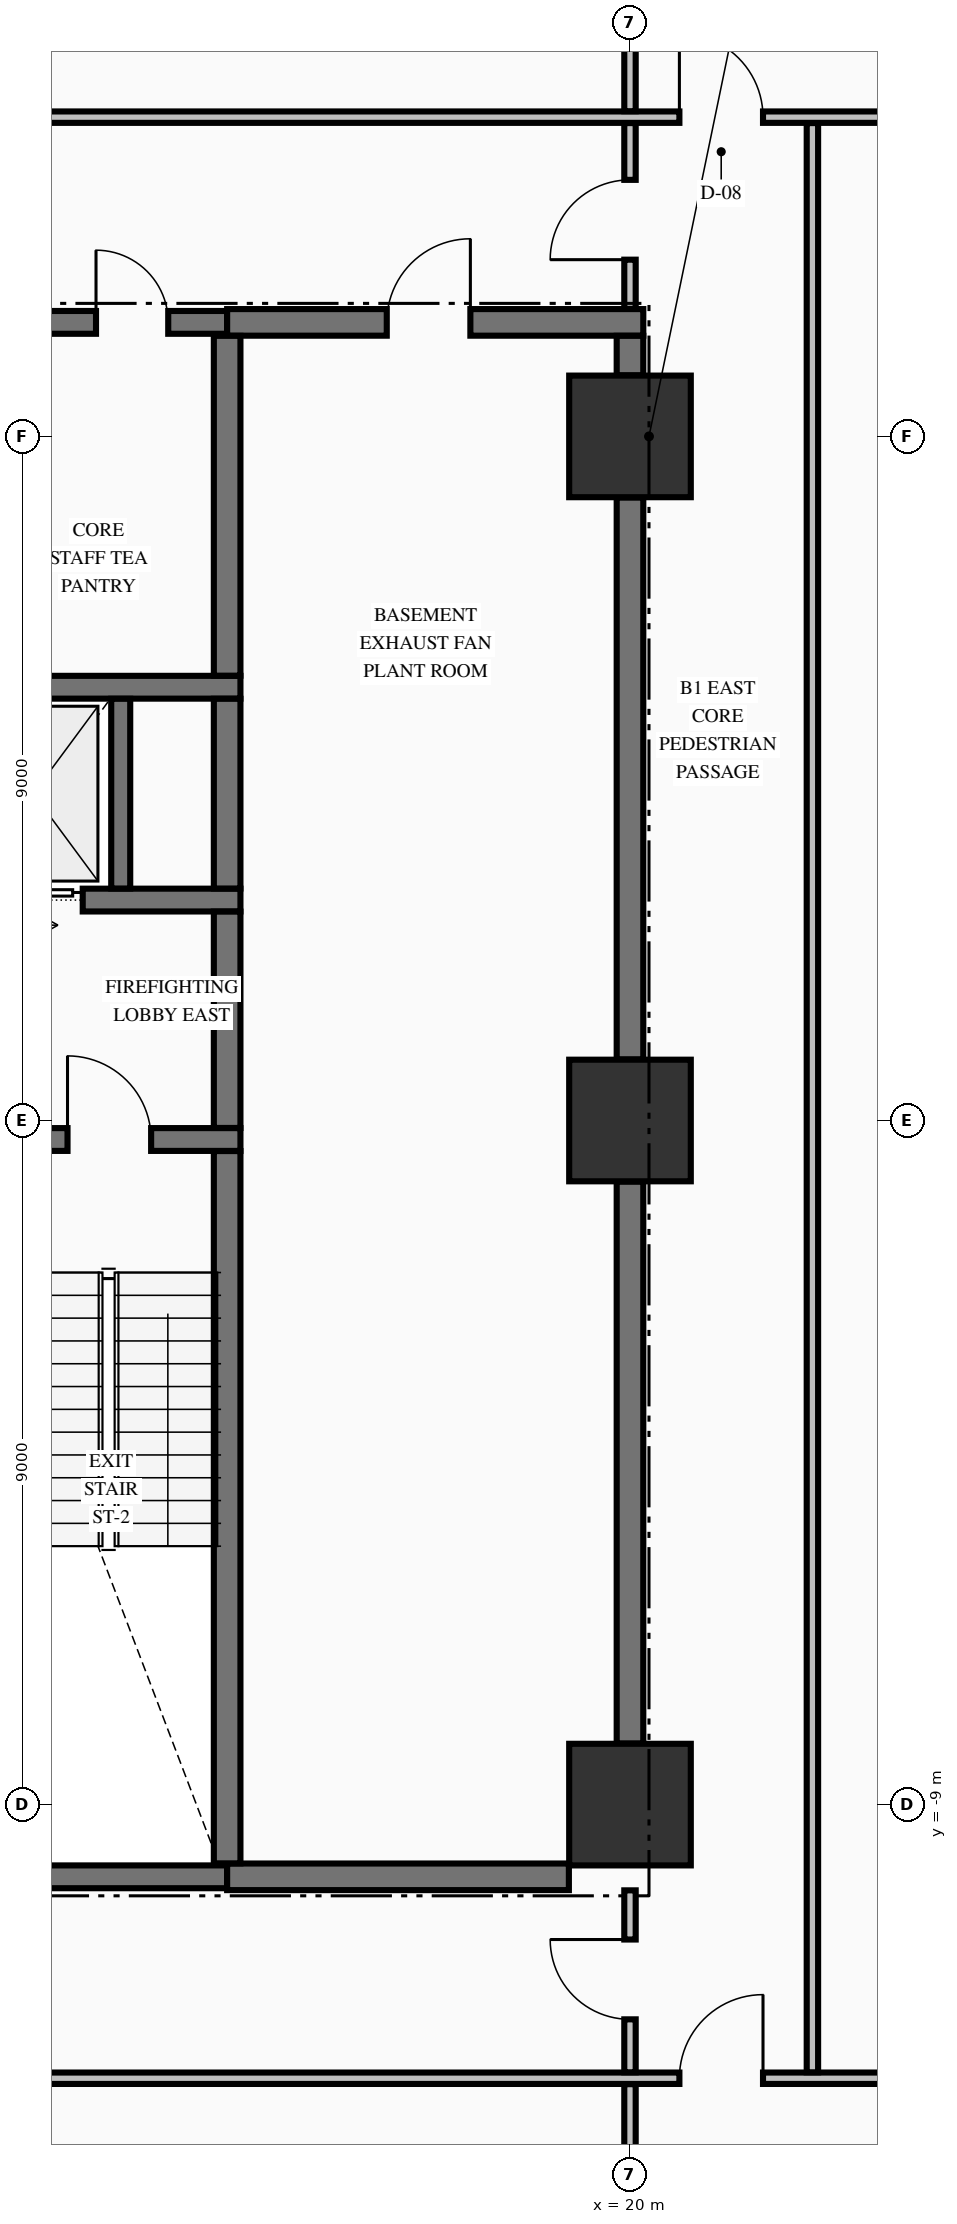
"""IFC4 building model, lengths in metres.
Left out: names, types, materials, properties, quantities, classifications, styles, units other than length and angle.
Written with IfcOpenShell. Run it as: python <this file> out.ifc"""

import sys

from ifc_helpers import new_model, si_unit, direction, frame, frame_2d, origin, origin_2d, place, context, subcontext, project, spatial, rectangle, extrude, element, fill, save


model = new_model("IFC4")
c1 = context("Model", 3, precision=1e-05, world=origin(), true_north=direction((0.0, 1.0)))
c2 = subcontext(c1, "Body", "Model", "MODEL_VIEW")
j1 = project(units=[si_unit("LENGTHUNIT", "METRE"), si_unit("PLANEANGLEUNIT", "RADIAN")], contexts=[c1])
p1 = place(None, origin())
s1 = spatial("IfcSite", under=j1, at=p1, CompositionType="ELEMENT")
p2 = place(p1, origin())
s2 = spatial("IfcBuilding", under=s1, at=p2, CompositionType="ELEMENT")
p3 = place(p2, frame((0.0, 0.0, -4.55)))
s3 = spatial("IfcBuildingStorey", under=s2, at=p3, CompositionType="ELEMENT", Elevation=-4.55)
for number, where, z_axis, x_axis in (
    (1, (20.0, -9.0, 0.0), (0.0, 0.0, 1.0), (1.0, 0.0, 0.0)),
    (2, (20.0, 0.0, 0.0), (0.0, 0.0, 1.0), (1.0, 0.0, 0.0)),
    (3, (20.0, 9.0, 0.0), (0.0, 0.0, 1.0), (1.0, 0.0, 0.0)),
):
    element("IfcColumn", number, at=place(p3, frame(where, z_axis=z_axis, x_axis=x_axis)), inside=s3, PredefinedType="COLUMN", context=c2, shape_type="SweptSolid", body=[
        extrude(rectangle(XDim=1.6, YDim=1.6, at=origin_2d()), origin(), (0.0, 0.0, 1.0), 4.2),
    ])
p4 = place(p3, frame((10.85, -9.95, 0.0), z_axis=(0.0, 0.0, 1.0), x_axis=(1.0, 0.0, 0.0)))
e4 = element("IfcWall", 4, at=p4, inside=s3, PredefinedType="SHEAR", context=c2, shape_type="SweptSolid", body=[
    extrude(rectangle(XDim=3.85, YDim=0.3, at=frame_2d((1.925, 0.0))), origin(), (0.0, 0.0, 1.0), 4.2),
])
p5 = place(p3, frame((14.7, -9.95, 0.0), z_axis=(0.0, 0.0, 1.0), x_axis=(1.0, 0.0, 0.0)))
e5 = element("IfcWall", 5, at=p5, inside=s3, PredefinedType="SHEAR", context=c2, shape_type="SweptSolid", body=[
    extrude(rectangle(XDim=4.496, YDim=0.35, at=frame_2d((2.248, 0.0))), origin(), (0.0, 0.0, 1.0), 4.2),
])
p6 = place(p3, frame((11.804, -0.25, 0.0), z_axis=(0.0, 0.0, 1.0), x_axis=(1.0, 0.0, 0.0)))
e6 = element("IfcWall", 6, at=p6, inside=s3, PredefinedType="SHEAR", context=c2, shape_type="SweptSolid", body=[
    extrude(rectangle(XDim=3.071, YDim=0.3, at=frame_2d((1.536, 0.0))), origin(), (0.0, 0.0, 1.0), 4.2),
])
p7 = place(p6, frame((0.796, 0.0, 0.0)))
e7 = element("IfcOpeningElement", 7, at=p7, cuts=e6, PredefinedType="OPENING", context=c2, shape_type="SweptSolid", body=[
    extrude(rectangle(XDim=1.1, YDim=2.15, at=frame_2d((0.55, 1.075))), frame((0.0, 0.16, 0.0), z_axis=(0.0, -1.0, 0.0), x_axis=(1.0, 0.0, 0.0)), (0.0, 0.0, 1.0), 0.32),
])
p8 = place(p3, frame((10.85, 2.9, 0.0), z_axis=(0.0, 0.0, 1.0), x_axis=(1.0, 0.0, 0.0)))
e8 = element("IfcWall", 8, at=p8, inside=s3, PredefinedType="SHEAR", context=c2, shape_type="SweptSolid", body=[
    extrude(rectangle(XDim=4.025, YDim=0.3, at=frame_2d((2.012, 0.0))), origin(), (0.0, 0.0, 1.0), 4.2),
])
p9 = place(p8, frame((0.85, 0.0, 0.0)))
e9 = element("IfcOpeningElement", 9, at=p9, cuts=e8, PredefinedType="OPENING", context=c2, shape_type="SweptSolid", body=[
    extrude(rectangle(XDim=1.1, YDim=2.2, at=frame_2d((0.55, 1.1))), frame((0.0, 0.16, 0.0), z_axis=(0.0, -1.0, 0.0), x_axis=(1.0, 0.0, 0.0)), (0.0, 0.0, 1.0), 0.32),
])
p10 = place(p3, frame((10.85, 5.7, 0.0), z_axis=(0.0, 0.0, 1.0), x_axis=(1.0, 0.0, 0.0)))
e10 = element("IfcWall", 10, at=p10, inside=s3, PredefinedType="SHEAR", context=c2, shape_type="SweptSolid", body=[
    extrude(rectangle(XDim=4.025, YDim=0.3, at=frame_2d((2.012, 0.0))), origin(), (0.0, 0.0, 1.0), 4.2),
])
p11 = place(p3, frame((10.85, 10.5, 0.0), z_axis=(0.0, 0.0, 1.0), x_axis=(1.0, 0.0, 0.0)))
e11 = element("IfcWall", 11, at=p11, inside=s3, PredefinedType="SHEAR", context=c2, shape_type="SweptSolid", body=[
    extrude(rectangle(XDim=3.85, YDim=0.3, at=frame_2d((1.925, 0.0))), origin(), (0.0, 0.0, 1.0), 4.2),
])
p12 = place(p11, frame((2.125, 0.0, 0.0)))
e12 = element("IfcOpeningElement", 12, at=p12, cuts=e11, PredefinedType="OPENING", context=c2, shape_type="SweptSolid", body=[
    extrude(rectangle(XDim=0.95, YDim=2.15, at=frame_2d((0.475, 1.075))), frame((0.0, 0.16, 0.0), z_axis=(0.0, -1.0, 0.0), x_axis=(1.0, 0.0, 0.0)), (0.0, 0.0, 1.0), 0.32),
])
p13 = place(p3, frame((14.7, 10.5, 0.0), z_axis=(0.0, 0.0, 1.0), x_axis=(1.0, 0.0, 0.0)))
e13 = element("IfcWall", 13, at=p13, inside=s3, PredefinedType="SHEAR", context=c2, shape_type="SweptSolid", body=[
    extrude(rectangle(XDim=5.475, YDim=0.35, at=frame_2d((2.738, 0.0))), origin(), (0.0, 0.0, 1.0), 4.2),
])
p14 = place(p13, frame((2.1, 0.0, 0.0)))
e14 = element("IfcOpeningElement", 14, at=p14, cuts=e13, PredefinedType="OPENING", context=c2, shape_type="SweptSolid", body=[
    extrude(rectangle(XDim=1.1, YDim=2.15, at=frame_2d((0.55, 1.075))), frame((0.0, 0.185, 0.0), z_axis=(0.0, -1.0, 0.0), x_axis=(1.0, 0.0, 0.0)), (0.0, 0.0, 1.0), 0.37),
])
p15 = place(p3, frame((-33.722, -12.6, 0.0), z_axis=(0.0, 0.0, 1.0), x_axis=(1.0, 0.0, 0.0)))
e15 = element("IfcWall", 15, at=p15, inside=s3, PredefinedType="PARTITIONING", context=c2, shape_type="SweptSolid", body=[
    extrude(rectangle(XDim=67.444, YDim=0.15, at=frame_2d((33.722, 0.0))), origin(), (0.0, 0.0, 1.0), 3.74),
])
p16 = place(p15, frame((11.972, 0.0, 0.0)))
e16 = element("IfcOpeningElement", 16, at=p16, cuts=e15, PredefinedType="OPENING", context=c2, shape_type="SweptSolid", body=[
    extrude(rectangle(XDim=1.1, YDim=2.15, at=frame_2d((0.55, 1.075))), frame((0.0, 0.085, 0.0), z_axis=(0.0, -1.0, 0.0), x_axis=(1.0, 0.0, 0.0)), (0.0, 0.0, 1.0), 0.17),
])
p17 = place(p15, frame((54.372, 0.0, 0.0)))
e17 = element("IfcOpeningElement", 17, at=p17, cuts=e15, PredefinedType="OPENING", context=c2, shape_type="SweptSolid", body=[
    extrude(rectangle(XDim=1.1, YDim=2.15, at=frame_2d((0.55, 1.075))), frame((0.0, 0.085, 0.0), z_axis=(0.0, -1.0, 0.0), x_axis=(1.0, 0.0, 0.0)), (0.0, 0.0, 1.0), 0.17),
])
p18 = place(p15, frame((38.622, 0.0, 0.0)))
e18 = element("IfcOpeningElement", 18, at=p18, cuts=e15, PredefinedType="OPENING", context=c2, shape_type="SweptSolid", body=[
    extrude(rectangle(XDim=1.2, YDim=2.15, at=frame_2d((0.6, 1.075))), frame((0.0, 0.085, 0.0), z_axis=(0.0, -1.0, 0.0), x_axis=(1.0, 0.0, 0.0)), (0.0, 0.0, 1.0), 0.17),
])
p19 = place(p3, frame((-22.475, 13.2, 0.0), z_axis=(0.0, 0.0, 1.0), x_axis=(1.0, 0.0, 0.0)))
e19 = element("IfcWall", 19, at=p19, inside=s3, PredefinedType="PARTITIONING", context=c2, shape_type="SweptSolid", body=[
    extrude(rectangle(XDim=56.197, YDim=0.15, at=frame_2d((28.099, 0.0))), origin(), (0.0, 0.0, 1.0), 4.2),
])
p20 = place(p19, frame((43.125, 0.0, 0.0)))
e20 = element("IfcOpeningElement", 20, at=p20, cuts=e19, PredefinedType="OPENING", context=c2, shape_type="SweptSolid", body=[
    extrude(rectangle(XDim=1.1, YDim=2.15, at=frame_2d((0.55, 1.075))), frame((0.0, 0.085, 0.0), z_axis=(0.0, -1.0, 0.0), x_axis=(1.0, 0.0, 0.0)), (0.0, 0.0, 1.0), 0.17),
])
p21 = place(p19, frame((27.375, 0.0, 0.0)))
e21 = element("IfcOpeningElement", 21, at=p21, cuts=e19, PredefinedType="OPENING", context=c2, shape_type="SweptSolid", body=[
    extrude(rectangle(XDim=1.2, YDim=2.15, at=frame_2d((0.6, 1.075))), frame((0.0, 0.085, 0.0), z_axis=(0.0, -1.0, 0.0), x_axis=(1.0, 0.0, 0.0)), (0.0, 0.0, 1.0), 0.17),
])
p22 = place(p19, frame((46.375, 0.0, 0.0)))
e22 = element("IfcOpeningElement", 22, at=p22, cuts=e19, PredefinedType="OPENING", context=c2, shape_type="SweptSolid", body=[
    extrude(rectangle(XDim=1.2, YDim=2.15, at=frame_2d((0.6, 1.075))), frame((0.0, 0.085, 0.0), z_axis=(0.0, -1.0, 0.0), x_axis=(1.0, 0.0, 0.0)), (0.0, 0.0, 1.0), 0.17),
])
p23 = place(p19, frame((16.6, 0.0, 0.0)))
e23 = element("IfcOpeningElement", 23, at=p23, cuts=e19, PredefinedType="OPENING", context=c2, shape_type="SweptSolid", body=[
    extrude(rectangle(XDim=0.95, YDim=2.15, at=frame_2d((0.475, 1.075))), frame((0.0, 0.085, 0.0), z_axis=(0.0, -1.0, 0.0), x_axis=(1.0, 0.0, 0.0)), (0.0, 0.0, 1.0), 0.17),
])
p24 = place(p3, frame((13.3, 3.052, 0.0), z_axis=(0.0, 0.0, 1.0), x_axis=(0.0, 1.0, 0.0)))
e24 = element("IfcWall", 24, at=p24, inside=s3, PredefinedType="SOLIDWALL", context=c2, shape_type="SweptSolid", body=[
    extrude(rectangle(XDim=2.496, YDim=0.25, at=frame_2d((1.248, 0.0))), origin(), (0.0, 0.0, 1.0), 4.2),
])
p25 = place(p3, frame((14.7, -9.773, 0.0), z_axis=(0.0, 0.0, 1.0), x_axis=(0.0, 1.0, 0.0)))
e25 = element("IfcWall", 25, at=p25, inside=s3, PredefinedType="SHEAR", context=c2, shape_type="SweptSolid", body=[
    extrude(rectangle(XDim=9.371, YDim=0.35, at=frame_2d((4.686, 0.0))), origin(), (0.0, 0.0, 1.0), 4.2),
])
p26 = place(p3, frame((14.7, -0.098, 0.0), z_axis=(0.0, 0.0, 1.0), x_axis=(0.0, 1.0, 0.0)))
e26 = element("IfcWall", 26, at=p26, inside=s3, PredefinedType="SHEAR", context=c2, shape_type="SweptSolid", body=[
    extrude(rectangle(XDim=2.846, YDim=0.35, at=frame_2d((1.423, 0.0))), origin(), (0.0, 0.0, 1.0), 4.2),
])
p27 = place(p3, frame((14.7, 3.052, 0.0), z_axis=(0.0, 0.0, 1.0), x_axis=(0.0, 1.0, 0.0)))
e27 = element("IfcWall", 27, at=p27, inside=s3, PredefinedType="SHEAR", context=c2, shape_type="SweptSolid", body=[
    extrude(rectangle(XDim=2.496, YDim=0.35, at=frame_2d((1.248, 0.0))), origin(), (0.0, 0.0, 1.0), 4.2),
])
p28 = place(p3, frame((14.7, 5.852, 0.0), z_axis=(0.0, 0.0, 1.0), x_axis=(0.0, 1.0, 0.0)))
e28 = element("IfcWall", 28, at=p28, inside=s3, PredefinedType="SHEAR", context=c2, shape_type="SweptSolid", body=[
    extrude(rectangle(XDim=4.471, YDim=0.35, at=frame_2d((2.235, 0.0))), origin(), (0.0, 0.0, 1.0), 4.2),
])
for number, where, z_axis, x_axis in (
    (29, (20.0, -8.196, 0.0), (0.0, 0.0, 1.0), (0.0, 1.0, 0.0)),
    (30, (20.0, 0.804, 0.0), (0.0, 0.0, 1.0), (0.0, 1.0, 0.0)),
):
    element("IfcWall", number, at=place(p3, frame(where, z_axis=z_axis, x_axis=x_axis)), inside=s3, PredefinedType="SHEAR", context=c2, shape_type="SweptSolid", body=[
        extrude(rectangle(XDim=7.392, YDim=0.35, at=frame_2d((3.696, 0.0))), origin(), (0.0, 0.0, 1.0), 4.2),
    ])
p29 = place(p3, frame((20.0, 9.804, 0.0), z_axis=(0.0, 0.0, 1.0), x_axis=(0.0, 1.0, 0.0)))
e31 = element("IfcWall", 31, at=p29, inside=s3, PredefinedType="SHEAR", context=c2, shape_type="SweptSolid", body=[
    extrude(rectangle(XDim=0.519, YDim=0.35, at=frame_2d((0.26, 0.0))), origin(), (0.0, 0.0, 1.0), 4.2),
])
p30 = place(p3, frame((20.0, -15.194, 0.0), z_axis=(0.0, 0.0, 1.0), x_axis=(0.0, 1.0, 0.0)))
e32 = element("IfcWall", 32, at=p30, inside=s3, PredefinedType="PARTITIONING", context=c2, shape_type="SweptSolid", body=[
    extrude(rectangle(XDim=2.516, YDim=0.15, at=frame_2d((1.258, 0.0))), origin(), (0.0, 0.0, 1.0), 3.242),
])
p31 = place(p3, frame((20.0, -12.522, 0.0), z_axis=(0.0, 0.0, 1.0), x_axis=(0.0, 1.0, 0.0)))
e33 = element("IfcWall", 33, at=p31, inside=s3, PredefinedType="PARTITIONING", context=c2, shape_type="SweptSolid", body=[
    extrude(rectangle(XDim=2.394, YDim=0.15, at=frame_2d((1.197, 0.0))), origin(), (0.0, 0.0, 1.0), 3.242),
])
p32 = place(p31, frame((0.697, 0.0, 0.0)))
e34 = element("IfcOpeningElement", 34, at=p32, cuts=e33, PredefinedType="OPENING", context=c2, shape_type="SweptSolid", body=[
    extrude(rectangle(XDim=1.05, YDim=2.15, at=frame_2d((0.525, 1.075))), frame((0.0, 0.085, 0.0), z_axis=(0.0, -1.0, 0.0), x_axis=(1.0, 0.0, 0.0)), (0.0, 0.0, 1.0), 0.17),
])
p33 = place(p3, frame((20.0, 10.678, 0.0), z_axis=(0.0, 0.0, 1.0), x_axis=(0.0, 1.0, 0.0)))
e35 = element("IfcWall", 35, at=p33, inside=s3, PredefinedType="PARTITIONING", context=c2, shape_type="SweptSolid", body=[
    extrude(rectangle(XDim=2.444, YDim=0.15, at=frame_2d((1.222, 0.0))), origin(), (0.0, 0.0, 1.0), 3.242),
])
p34 = place(p33, frame((0.647, 0.0, 0.0)))
e36 = element("IfcOpeningElement", 36, at=p34, cuts=e35, PredefinedType="OPENING", context=c2, shape_type="SweptSolid", body=[
    extrude(rectangle(XDim=1.05, YDim=2.15, at=frame_2d((0.525, 1.075))), frame((0.0, 0.085, 0.0), z_axis=(0.0, -1.0, 0.0), x_axis=(1.0, 0.0, 0.0)), (0.0, 0.0, 1.0), 0.17),
])
p35 = place(p3, frame((20.0, 13.278, 0.0), z_axis=(0.0, 0.0, 1.0), x_axis=(0.0, 1.0, 0.0)))
e37 = element("IfcWall", 37, at=p35, inside=s3, PredefinedType="PARTITIONING", context=c2, shape_type="SweptSolid", body=[
    extrude(rectangle(XDim=1.916, YDim=0.15, at=frame_2d((0.958, 0.0))), origin(), (0.0, 0.0, 1.0), 3.242),
])
p36 = place(p3, frame((22.4, -12.522, 0.0), z_axis=(0.0, 0.0, 1.0), x_axis=(0.0, 1.0, 0.0)))
e38 = element("IfcWall", 38, at=p36, inside=s3, PredefinedType="PARTITIONING", context=c2, shape_type="SweptSolid", body=[
    extrude(rectangle(XDim=25.644, YDim=0.15, at=frame_2d((12.822, 0.0))), origin(), (0.0, 0.0, 1.0), 4.2),
])
p37 = place(p7, origin())
e39 = element("IfcDoor", 39, at=p37, inside=s3, OperationType="SINGLE_SWING_LEFT", PredefinedType="DOOR", context=c2, shape_type="SweptSolid", body=[
    extrude(rectangle(XDim=1.1, YDim=2.15, at=frame_2d((0.55, 1.075))), frame((0.0, 0.025, 0.0), z_axis=(0.0, -1.0, 0.0), x_axis=(1.0, 0.0, 0.0)), (0.0, 0.0, 1.0), 0.05),
])
fill(e7, e39)
p38 = place(p9, origin())
e40 = element("IfcDoor", 40, at=p38, inside=s3, OperationType="SLIDING_TO_RIGHT", PredefinedType="DOOR", context=c2, shape_type="SweptSolid", body=[
    extrude(rectangle(XDim=1.1, YDim=2.2, at=frame_2d((0.55, 1.1))), frame((0.0, 0.025, 0.0), z_axis=(0.0, -1.0, 0.0), x_axis=(1.0, 0.0, 0.0)), (0.0, 0.0, 1.0), 0.05),
])
fill(e9, e40)
p39 = place(p12, origin())
e41 = element("IfcDoor", 41, at=p39, inside=s3, OperationType="SINGLE_SWING_LEFT", PredefinedType="DOOR", context=c2, shape_type="SweptSolid", body=[
    extrude(rectangle(XDim=0.95, YDim=2.15, at=frame_2d((0.475, 1.075))), frame((0.0, 0.025, 0.0), z_axis=(0.0, -1.0, 0.0), x_axis=(1.0, 0.0, 0.0)), (0.0, 0.0, 1.0), 0.05),
])
fill(e12, e41)
p40 = place(p14, origin())
e42 = element("IfcDoor", 42, at=p40, inside=s3, OperationType="SINGLE_SWING_RIGHT", PredefinedType="DOOR", context=c2, shape_type="SweptSolid", body=[
    extrude(rectangle(XDim=1.1, YDim=2.15, at=frame_2d((0.55, 1.075))), frame((0.0, 0.025, 0.0), z_axis=(0.0, -1.0, 0.0), x_axis=(1.0, 0.0, 0.0)), (0.0, 0.0, 1.0), 0.05),
])
fill(e14, e42)
p41 = place(p34, origin())
e43 = element("IfcDoor", 43, at=p41, inside=s3, OperationType="SINGLE_SWING_LEFT", PredefinedType="DOOR", context=c2, shape_type="SweptSolid", body=[
    extrude(rectangle(XDim=1.05, YDim=2.15, at=frame_2d((0.525, 1.075))), frame((0.0, 0.025, 0.0), z_axis=(0.0, -1.0, 0.0), x_axis=(1.0, 0.0, 0.0)), (0.0, 0.0, 1.0), 0.05),
])
fill(e36, e43)
p42 = place(p32, origin())
e44 = element("IfcDoor", 44, at=p42, inside=s3, OperationType="SINGLE_SWING_RIGHT", PredefinedType="DOOR", context=c2, shape_type="SweptSolid", body=[
    extrude(rectangle(XDim=1.05, YDim=2.15, at=frame_2d((0.525, 1.075))), frame((0.0, 0.025, 0.0), z_axis=(0.0, -1.0, 0.0), x_axis=(1.0, 0.0, 0.0)), (0.0, 0.0, 1.0), 0.05),
])
fill(e34, e44)
p43 = place(p20, origin())
e45 = element("IfcDoor", 45, at=p43, inside=s3, OperationType="SINGLE_SWING_LEFT", PredefinedType="DOOR", context=c2, shape_type="SweptSolid", body=[
    extrude(rectangle(XDim=1.1, YDim=2.15, at=frame_2d((0.55, 1.075))), frame((0.0, 0.025, 0.0), z_axis=(0.0, -1.0, 0.0), x_axis=(1.0, 0.0, 0.0)), (0.0, 0.0, 1.0), 0.05),
])
fill(e20, e45)
p44 = place(p17, origin())
e46 = element("IfcDoor", 46, at=p44, inside=s3, OperationType="SINGLE_SWING_RIGHT", PredefinedType="DOOR", context=c2, shape_type="SweptSolid", body=[
    extrude(rectangle(XDim=1.1, YDim=2.15, at=frame_2d((0.55, 1.075))), frame((0.0, 0.025, 0.0), z_axis=(0.0, -1.0, 0.0), x_axis=(1.0, 0.0, 0.0)), (0.0, 0.0, 1.0), 0.05),
])
fill(e17, e46)
save(model, sys.argv[1])
